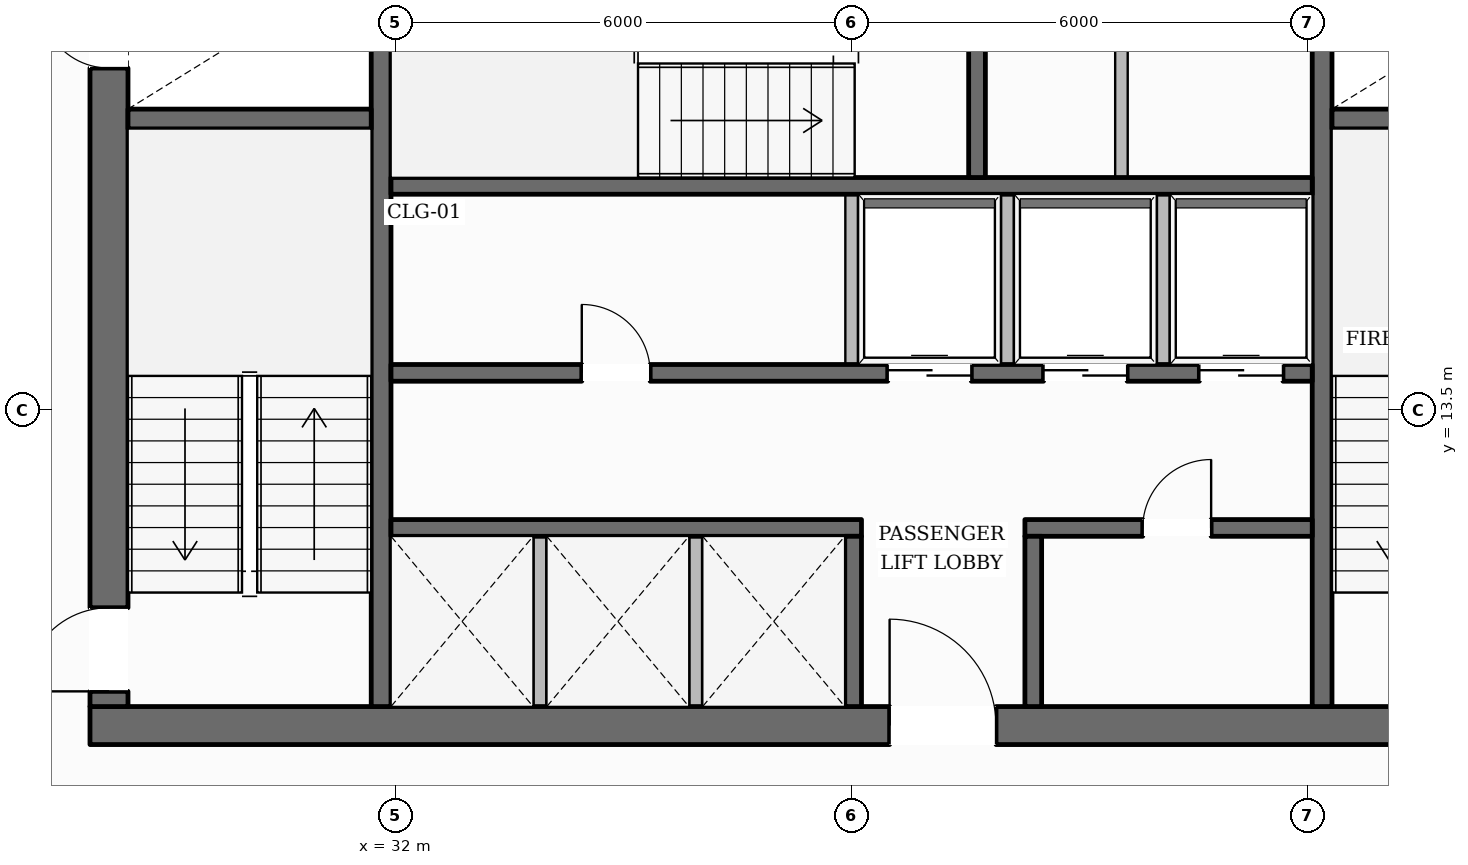
"""IFC4 building model, lengths in metres.
Left out: names, types, materials, properties, quantities, classifications, styles, units other than length and angle.
Written with IfcOpenShell. Run it as: python <this file> out.ifc"""

import sys

from ifc_helpers import new_model, si_unit, direction, frame, frame_2d, origin, place, context, subcontext, project, spatial, rectangle, extrude, element, fill, save


model = new_model("IFC4")
c1 = context("Model", 3, precision=1e-05, world=origin(), true_north=direction((0.0, 1.0)))
c2 = subcontext(c1, "Body", "Model", "MODEL_VIEW")
j1 = project(units=[si_unit("LENGTHUNIT", "METRE"), si_unit("PLANEANGLEUNIT", "RADIAN")], contexts=[c1])
p1 = place(None, origin())
s1 = spatial("IfcSite", under=j1, at=p1, CompositionType="ELEMENT")
p2 = place(p1, origin())
s2 = spatial("IfcBuilding", under=s1, at=p2, CompositionType="ELEMENT")
p3 = place(p2, frame((0.0, 0.0, 143.25)))
s3 = spatial("IfcBuildingStorey", under=s2, at=p3, CompositionType="ELEMENT", Elevation=143.25)
p4 = place(p3, frame((27.98, 9.35, 0.0), z_axis=(0.0, 0.0, 1.0), x_axis=(1.0, 0.0, 0.0)))
e1 = element("IfcWall", 1, at=p4, inside=s3, PredefinedType="SOLIDWALL", context=c2, shape_type="SweptSolid", body=[
    extrude(rectangle(XDim=20.04, YDim=0.5, at=frame_2d((10.02, 0.0))), origin(), (0.0, 0.0, 1.0), 3.6),
])
p5 = place(p4, frame((10.52, 0.0, 0.0)))
e2 = element("IfcOpeningElement", 2, at=p5, cuts=e1, PredefinedType="OPENING", context=c2, shape_type="SweptSolid", body=[
    extrude(rectangle(XDim=1.4, YDim=2.2, at=frame_2d((0.7, 1.1))), frame((0.0, 0.26, 0.0), z_axis=(0.0, -1.0, 0.0), x_axis=(1.0, 0.0, 0.0)), (0.0, 0.0, 1.0), 0.52),
])
p6 = place(p3, frame((28.23, 9.6, 0.0), z_axis=(0.0, 0.0, 1.0), x_axis=(0.0, 1.0, 0.0)))
e3 = element("IfcWall", 3, at=p6, inside=s3, PredefinedType="SOLIDWALL", context=c2, shape_type="SweptSolid", body=[
    extrude(rectangle(XDim=13.0, YDim=0.5, at=frame_2d((6.5, 0.0))), origin(), (0.0, 0.0, 1.0), 3.6),
])
p7 = place(p6, frame((0.2, 0.0, 0.0)))
e4 = element("IfcOpeningElement", 4, at=p7, cuts=e3, PredefinedType="OPENING", context=c2, shape_type="SweptSolid", body=[
    extrude(rectangle(XDim=1.1, YDim=2.15, at=frame_2d((0.55, 1.075))), frame((0.0, 0.26, 0.0), z_axis=(0.0, -1.0, 0.0), x_axis=(1.0, 0.0, 0.0)), (0.0, 0.0, 1.0), 0.52),
])
p8 = place(p6, frame((8.4, 0.0, 0.0)))
e5 = element("IfcOpeningElement", 5, at=p8, cuts=e3, PredefinedType="OPENING", context=c2, shape_type="SweptSolid", body=[
    extrude(rectangle(XDim=0.9, YDim=2.1, at=frame_2d((0.45, 1.05))), frame((0.0, 0.26, 0.0), z_axis=(0.0, -1.0, 0.0), x_axis=(1.0, 0.0, 0.0)), (0.0, 0.0, 1.0), 0.52),
])
p9 = place(p3, frame((31.81, 9.6, 0.0), z_axis=(0.0, 0.0, 1.0), x_axis=(0.0, 1.0, 0.0)))
e6 = element("IfcWall", 6, at=p9, inside=s3, PredefinedType="SHEAR", context=c2, shape_type="SweptSolid", body=[
    extrude(rectangle(XDim=13.0, YDim=0.26, at=frame_2d((6.5, 0.0))), origin(), (0.0, 0.0, 1.0), 3.6),
])
p10 = place(p9, frame((10.925, 0.0, 0.0)))
e7 = element("IfcOpeningElement", 7, at=p10, cuts=e6, PredefinedType="OPENING", context=c2, shape_type="SweptSolid", body=[
    extrude(rectangle(XDim=1.25, YDim=2.25, at=frame_2d((0.625, 1.125))), frame((0.0, 0.14, 0.0), z_axis=(0.0, -1.0, 0.0), x_axis=(1.0, 0.0, 0.0)), (0.0, 0.0, 1.0), 0.28),
])
p11 = place(p3, frame((44.19, 9.6, 0.0), z_axis=(0.0, 0.0, 1.0), x_axis=(0.0, 1.0, 0.0)))
e8 = element("IfcWall", 8, at=p11, inside=s3, PredefinedType="SHEAR", context=c2, shape_type="SweptSolid", body=[
    extrude(rectangle(XDim=13.0, YDim=0.26, at=frame_2d((6.5, 0.0))), origin(), (0.0, 0.0, 1.0), 3.6),
])
p12 = place(p11, frame((10.925, 0.0, 0.0)))
e9 = element("IfcOpeningElement", 9, at=p12, cuts=e8, PredefinedType="OPENING", context=c2, shape_type="SweptSolid", body=[
    extrude(rectangle(XDim=1.25, YDim=2.25, at=frame_2d((0.625, 1.125))), frame((0.0, 0.14, 0.0), z_axis=(0.0, -1.0, 0.0), x_axis=(1.0, 0.0, 0.0)), (0.0, 0.0, 1.0), 0.28),
])
for number, where, z_axis, x_axis in (
    (10, (28.48, 17.33, 0.0), (0.0, 0.0, 1.0), (1.0, 0.0, 0.0)),
    (11, (44.32, 17.33, 0.0), (0.0, 0.0, 1.0), (1.0, 0.0, 0.0)),
):
    element("IfcWall", number, at=place(p3, frame(where, z_axis=z_axis, x_axis=x_axis)), inside=s3, PredefinedType="SHEAR", context=c2, shape_type="SweptSolid", body=[
        extrude(rectangle(XDim=3.2, YDim=0.26, at=frame_2d((1.6, 0.0))), origin(), (0.0, 0.0, 1.0), 3.6),
    ])
p13 = place(p3, frame((31.94, 16.45, 0.0), z_axis=(0.0, 0.0, 1.0), x_axis=(1.0, 0.0, 0.0)))
e12 = element("IfcWall", 12, at=p13, inside=s3, PredefinedType="SOLIDWALL", context=c2, shape_type="SweptSolid", body=[
    extrude(rectangle(XDim=12.12, YDim=0.22, at=frame_2d((6.06, 0.0))), origin(), (0.0, 0.0, 1.0), 3.6),
])
p14 = place(p3, frame((39.65, 16.56, 0.0), z_axis=(0.0, 0.0, 1.0), x_axis=(0.0, 1.0, 0.0)))
e13 = element("IfcWall", 13, at=p14, inside=s3, PredefinedType="SOLIDWALL", context=c2, shape_type="SweptSolid", body=[
    extrude(rectangle(XDim=3.2, YDim=0.22, at=frame_2d((1.6, 0.0))), origin(), (0.0, 0.0, 1.0), 3.6),
])
p15 = place(p3, frame((31.94, 13.99, 0.0), z_axis=(0.0, 0.0, 1.0), x_axis=(1.0, 0.0, 0.0)))
e14 = element("IfcWall", 14, at=p15, inside=s3, PredefinedType="SOLIDWALL", context=c2, shape_type="SweptSolid", body=[
    extrude(rectangle(XDim=12.12, YDim=0.22, at=frame_2d((6.06, 0.0))), origin(), (0.0, 0.0, 1.0), 3.6),
])
p16 = place(p15, frame((2.51, 0.0, 0.0)))
e15 = element("IfcOpeningElement", 15, at=p16, cuts=e14, PredefinedType="OPENING", context=c2, shape_type="SweptSolid", body=[
    extrude(rectangle(XDim=0.9, YDim=2.1, at=frame_2d((0.45, 1.05))), frame((0.0, 0.12, 0.0), z_axis=(0.0, -1.0, 0.0), x_axis=(1.0, 0.0, 0.0)), (0.0, 0.0, 1.0), 0.24),
])
p17 = place(p15, frame((6.535, 0.0, 0.0)))
e16 = element("IfcOpeningElement", 16, at=p17, cuts=e14, PredefinedType="OPENING", context=c2, shape_type="SweptSolid", body=[
    extrude(rectangle(XDim=1.1, YDim=2.2, at=frame_2d((0.55, 1.1))), frame((0.0, 0.12, 0.0), z_axis=(0.0, -1.0, 0.0), x_axis=(1.0, 0.0, 0.0)), (0.0, 0.0, 1.0), 0.24),
])
p18 = place(p15, frame((8.585, 0.0, 0.0)))
e17 = element("IfcOpeningElement", 17, at=p18, cuts=e14, PredefinedType="OPENING", context=c2, shape_type="SweptSolid", body=[
    extrude(rectangle(XDim=1.1, YDim=2.2, at=frame_2d((0.55, 1.1))), frame((0.0, 0.12, 0.0), z_axis=(0.0, -1.0, 0.0), x_axis=(1.0, 0.0, 0.0)), (0.0, 0.0, 1.0), 0.24),
])
p19 = place(p15, frame((10.635, 0.0, 0.0)))
e18 = element("IfcOpeningElement", 18, at=p19, cuts=e14, PredefinedType="OPENING", context=c2, shape_type="SweptSolid", body=[
    extrude(rectangle(XDim=1.1, YDim=2.2, at=frame_2d((0.55, 1.1))), frame((0.0, 0.12, 0.0), z_axis=(0.0, -1.0, 0.0), x_axis=(1.0, 0.0, 0.0)), (0.0, 0.0, 1.0), 0.24),
])
p20 = place(p3, frame((31.94, 11.95, 0.0), z_axis=(0.0, 0.0, 1.0), x_axis=(1.0, 0.0, 0.0)))
e19 = element("IfcWall", 19, at=p20, inside=s3, PredefinedType="SOLIDWALL", context=c2, shape_type="SweptSolid", body=[
    extrude(rectangle(XDim=6.19, YDim=0.22, at=frame_2d((3.095, 0.0))), origin(), (0.0, 0.0, 1.0), 3.6),
])
p21 = place(p3, frame((40.28, 11.95, 0.0), z_axis=(0.0, 0.0, 1.0), x_axis=(1.0, 0.0, 0.0)))
e20 = element("IfcWall", 20, at=p21, inside=s3, PredefinedType="SOLIDWALL", context=c2, shape_type="SweptSolid", body=[
    extrude(rectangle(XDim=3.78, YDim=0.22, at=frame_2d((1.89, 0.0))), origin(), (0.0, 0.0, 1.0), 3.6),
])
p22 = place(p21, frame((1.55, 0.0, 0.0)))
e21 = element("IfcOpeningElement", 21, at=p22, cuts=e20, PredefinedType="OPENING", context=c2, shape_type="SweptSolid", body=[
    extrude(rectangle(XDim=0.9, YDim=2.1, at=frame_2d((0.45, 1.05))), frame((0.0, 0.12, 0.0), z_axis=(0.0, -1.0, 0.0), x_axis=(1.0, 0.0, 0.0)), (0.0, 0.0, 1.0), 0.24),
])
for number, where, z_axis, x_axis in (
    (22, (38.02, 9.6, 0.0), (0.0, 0.0, 1.0), (0.0, 1.0, 0.0)),
    (23, (40.39, 9.6, 0.0), (0.0, 0.0, 1.0), (0.0, 1.0, 0.0)),
):
    element("IfcWall", number, at=place(p3, frame(where, z_axis=z_axis, x_axis=x_axis)), inside=s3, PredefinedType="SOLIDWALL", context=c2, shape_type="SweptSolid", body=[
        extrude(rectangle(XDim=2.24, YDim=0.22, at=frame_2d((1.12, 0.0))), origin(), (0.0, 0.0, 1.0), 3.6),
    ])
p23 = place(p3, frame((13.223, 11.91, 0.0), z_axis=(0.0, 0.0, 1.0), x_axis=(0.505453242286, 0.86285399684, 0.0)))
e24 = element("IfcWall", 24, at=p23, inside=s3, PredefinedType="STANDARD", context=c2, shape_type="SweptSolid", body=[
    extrude(rectangle(XDim=38.125, YDim=0.38, at=frame_2d((19.062, 0.0))), origin(), (0.0, 0.0, 1.0), 3.059),
])
p24 = place(p23, frame((27.994, 0.0, 0.0)))
e25 = element("IfcOpeningElement", 25, at=p24, cuts=e24, PredefinedType="OPENING", context=c2, shape_type="SweptSolid", body=[
    extrude(rectangle(XDim=1.0, YDim=2.2, at=frame_2d((0.5, 1.1))), frame((0.0, 0.2, 0.0), z_axis=(0.0, -1.0, 0.0), x_axis=(1.0, 0.0, 0.0)), (0.0, 0.0, 1.0), 0.4),
])
p25 = place(p23, frame((33.78, 0.0, 0.65)))
e26 = element("IfcOpeningElement", 26, at=p25, cuts=e24, PredefinedType="OPENING", context=c2, shape_type="SweptSolid", body=[
    extrude(rectangle(XDim=1.55, YDim=1.75, at=frame_2d((0.775, 0.875))), frame((0.0, 0.2, 0.0), z_axis=(0.0, -1.0, 0.0), x_axis=(1.0, 0.0, 0.0)), (0.0, 0.0, 1.0), 0.4),
])
p26 = place(p23, frame((21.388, 0.0, 0.65)))
e27 = element("IfcOpeningElement", 27, at=p26, cuts=e24, PredefinedType="OPENING", context=c2, shape_type="SweptSolid", body=[
    extrude(rectangle(XDim=1.55, YDim=1.75, at=frame_2d((0.775, 0.875))), frame((0.0, 0.2, 0.0), z_axis=(0.0, -1.0, 0.0), x_axis=(1.0, 0.0, 0.0)), (0.0, 0.0, 1.0), 0.4),
])
p27 = place(p23, frame((8.997, 0.0, 0.65)))
e28 = element("IfcOpeningElement", 28, at=p27, cuts=e24, PredefinedType="OPENING", context=c2, shape_type="SweptSolid", body=[
    extrude(rectangle(XDim=1.55, YDim=1.75, at=frame_2d((0.775, 0.875))), frame((0.0, 0.2, 0.0), z_axis=(0.0, -1.0, 0.0), x_axis=(1.0, 0.0, 0.0)), (0.0, 0.0, 1.0), 0.4),
])
p28 = place(p23, frame((2.802, 0.0, 0.65)))
e29 = element("IfcOpeningElement", 29, at=p28, cuts=e24, PredefinedType="OPENING", context=c2, shape_type="SweptSolid", body=[
    extrude(rectangle(XDim=1.55, YDim=1.75, at=frame_2d((0.775, 0.875))), frame((0.0, 0.2, 0.0), z_axis=(0.0, -1.0, 0.0), x_axis=(1.0, 0.0, 0.0)), (0.0, 0.0, 1.0), 0.4),
])
p29 = place(p3, frame((43.361, 44.893, 0.0), z_axis=(0.0, 0.0, 1.0), x_axis=(0.499094622433, -0.866547493135, 0.0)))
e30 = element("IfcWall", 30, at=p29, inside=s3, PredefinedType="STANDARD", context=c2, shape_type="SweptSolid", body=[
    extrude(rectangle(XDim=37.644, YDim=0.38, at=frame_2d((18.822, 0.0))), origin(), (0.0, 0.0, 1.0), 3.059),
])
p30 = place(p29, frame((33.333, 0.0, 0.65)))
e31 = element("IfcOpeningElement", 31, at=p30, cuts=e30, PredefinedType="OPENING", context=c2, shape_type="SweptSolid", body=[
    extrude(rectangle(XDim=1.55, YDim=1.75, at=frame_2d((0.775, 0.875))), frame((0.0, 0.2, 0.0), z_axis=(0.0, -1.0, 0.0), x_axis=(1.0, 0.0, 0.0)), (0.0, 0.0, 1.0), 0.4),
])
p31 = place(p29, frame((27.219, 0.0, 0.65)))
e32 = element("IfcOpeningElement", 32, at=p31, cuts=e30, PredefinedType="OPENING", context=c2, shape_type="SweptSolid", body=[
    extrude(rectangle(XDim=1.55, YDim=1.75, at=frame_2d((0.775, 0.875))), frame((0.0, 0.2, 0.0), z_axis=(0.0, -1.0, 0.0), x_axis=(1.0, 0.0, 0.0)), (0.0, 0.0, 1.0), 0.4),
])
p32 = place(p29, frame((21.105, 0.0, 0.65)))
e33 = element("IfcOpeningElement", 33, at=p32, cuts=e30, PredefinedType="OPENING", context=c2, shape_type="SweptSolid", body=[
    extrude(rectangle(XDim=1.55, YDim=1.75, at=frame_2d((0.775, 0.875))), frame((0.0, 0.2, 0.0), z_axis=(0.0, -1.0, 0.0), x_axis=(1.0, 0.0, 0.0)), (0.0, 0.0, 1.0), 0.4),
])
p33 = place(p29, frame((8.876, 0.0, 0.65)))
e34 = element("IfcOpeningElement", 34, at=p33, cuts=e30, PredefinedType="OPENING", context=c2, shape_type="SweptSolid", body=[
    extrude(rectangle(XDim=1.55, YDim=1.75, at=frame_2d((0.775, 0.875))), frame((0.0, 0.2, 0.0), z_axis=(0.0, -1.0, 0.0), x_axis=(1.0, 0.0, 0.0)), (0.0, 0.0, 1.0), 0.4),
])
p34 = place(p29, frame((2.762, 0.0, 0.65)))
e35 = element("IfcOpeningElement", 35, at=p34, cuts=e30, PredefinedType="OPENING", context=c2, shape_type="SweptSolid", body=[
    extrude(rectangle(XDim=1.55, YDim=1.75, at=frame_2d((0.775, 0.875))), frame((0.0, 0.2, 0.0), z_axis=(0.0, -1.0, 0.0), x_axis=(1.0, 0.0, 0.0)), (0.0, 0.0, 1.0), 0.4),
])
for number, where, z_axis, x_axis in (
    (36, (33.9, 9.55, 0.0), (0.0, 0.0, 1.0), (0.0, 1.0, 0.0)),
    (37, (35.95, 9.55, 0.0), (0.0, 0.0, 1.0), (0.0, 1.0, 0.0)),
):
    element("IfcWall", number, at=place(p3, frame(where, z_axis=z_axis, x_axis=x_axis)), inside=s3, PredefinedType="PARTITIONING", context=c2, shape_type="SweptSolid", body=[
        extrude(rectangle(XDim=2.29, YDim=0.165, at=frame_2d((1.145, 0.0))), origin(), (0.0, 0.0, 1.0), 3.6),
    ])
for number, where, z_axis, x_axis in (
    (38, (38.0, 14.1, 0.0), (0.0, 0.0, 1.0), (0.0, 1.0, 0.0)),
    (39, (40.05, 14.1, 0.0), (0.0, 0.0, 1.0), (0.0, 1.0, 0.0)),
    (40, (42.1, 14.1, 0.0), (0.0, 0.0, 1.0), (0.0, 1.0, 0.0)),
):
    element("IfcWall", number, at=place(p3, frame(where, z_axis=z_axis, x_axis=x_axis)), inside=s3, PredefinedType="PARTITIONING", context=c2, shape_type="SweptSolid", body=[
        extrude(rectangle(XDim=2.24, YDim=0.165, at=frame_2d((1.12, 0.0))), origin(), (0.0, 0.0, 1.0), 3.6),
    ])
p35 = place(p3, frame((41.55, 16.56, 0.0), z_axis=(0.0, 0.0, 1.0), x_axis=(0.0, 1.0, 0.0)))
e41 = element("IfcWall", 41, at=p35, inside=s3, PredefinedType="PARTITIONING", context=c2, shape_type="SweptSolid", body=[
    extrude(rectangle(XDim=3.2, YDim=0.165, at=frame_2d((1.6, 0.0))), origin(), (0.0, 0.0, 1.0), 3.6),
])
p36 = place(p7, origin())
e42 = element("IfcDoor", 42, at=p36, inside=s3, OperationType="SINGLE_SWING_LEFT", PredefinedType="DOOR", context=c2, shape_type="SweptSolid", body=[
    extrude(rectangle(XDim=1.1, YDim=2.15, at=frame_2d((0.55, 1.075))), frame((0.0, 0.025, 0.0), z_axis=(0.0, -1.0, 0.0), x_axis=(1.0, 0.0, 0.0)), (0.0, 0.0, 1.0), 0.05),
])
fill(e4, e42)
p37 = place(p8, origin())
e43 = element("IfcDoor", 43, at=p37, inside=s3, OperationType="SINGLE_SWING_RIGHT", PredefinedType="DOOR", context=c2, shape_type="SweptSolid", body=[
    extrude(rectangle(XDim=0.9, YDim=2.1, at=frame_2d((0.45, 1.05))), frame((0.0, 0.025, 0.0), z_axis=(0.0, -1.0, 0.0), x_axis=(1.0, 0.0, 0.0)), (0.0, 0.0, 1.0), 0.05),
])
fill(e5, e43)
p38 = place(p5, origin())
e44 = element("IfcDoor", 44, at=p38, inside=s3, OperationType="SINGLE_SWING_LEFT", PredefinedType="DOOR", context=c2, shape_type="SweptSolid", body=[
    extrude(rectangle(XDim=1.4, YDim=2.2, at=frame_2d((0.7, 1.1))), frame((0.0, 0.025, 0.0), z_axis=(0.0, -1.0, 0.0), x_axis=(1.0, 0.0, 0.0)), (0.0, 0.0, 1.0), 0.05),
])
fill(e2, e44)
p39 = place(p16, origin())
e45 = element("IfcDoor", 45, at=p39, inside=s3, OperationType="SINGLE_SWING_LEFT", PredefinedType="DOOR", context=c2, shape_type="SweptSolid", body=[
    extrude(rectangle(XDim=0.9, YDim=2.1, at=frame_2d((0.45, 1.05))), frame((0.0, 0.025, 0.0), z_axis=(0.0, -1.0, 0.0), x_axis=(1.0, 0.0, 0.0)), (0.0, 0.0, 1.0), 0.05),
])
fill(e15, e45)
p40 = place(p17, origin())
e46 = element("IfcDoor", 46, at=p40, inside=s3, OperationType="DOUBLE_DOOR_SLIDING", PredefinedType="DOOR", context=c2, shape_type="SweptSolid", body=[
    extrude(rectangle(XDim=1.1, YDim=2.2, at=frame_2d((0.55, 1.1))), frame((0.0, 0.025, 0.0), z_axis=(0.0, -1.0, 0.0), x_axis=(1.0, 0.0, 0.0)), (0.0, 0.0, 1.0), 0.05),
])
fill(e16, e46)
p41 = place(p18, origin())
e47 = element("IfcDoor", 47, at=p41, inside=s3, OperationType="DOUBLE_DOOR_SLIDING", PredefinedType="DOOR", context=c2, shape_type="SweptSolid", body=[
    extrude(rectangle(XDim=1.1, YDim=2.2, at=frame_2d((0.55, 1.1))), frame((0.0, 0.025, 0.0), z_axis=(0.0, -1.0, 0.0), x_axis=(1.0, 0.0, 0.0)), (0.0, 0.0, 1.0), 0.05),
])
fill(e17, e47)
p42 = place(p19, origin())
e48 = element("IfcDoor", 48, at=p42, inside=s3, OperationType="DOUBLE_DOOR_SLIDING", PredefinedType="DOOR", context=c2, shape_type="SweptSolid", body=[
    extrude(rectangle(XDim=1.1, YDim=2.2, at=frame_2d((0.55, 1.1))), frame((0.0, 0.025, 0.0), z_axis=(0.0, -1.0, 0.0), x_axis=(1.0, 0.0, 0.0)), (0.0, 0.0, 1.0), 0.05),
])
fill(e18, e48)
p43 = place(p22, origin())
e49 = element("IfcDoor", 49, at=p43, inside=s3, OperationType="SINGLE_SWING_RIGHT", PredefinedType="DOOR", context=c2, shape_type="SweptSolid", body=[
    extrude(rectangle(XDim=0.9, YDim=2.1, at=frame_2d((0.45, 1.05))), frame((0.0, 0.025, 0.0), z_axis=(0.0, -1.0, 0.0), x_axis=(1.0, 0.0, 0.0)), (0.0, 0.0, 1.0), 0.05),
])
fill(e21, e49)
save(model, sys.argv[1])
